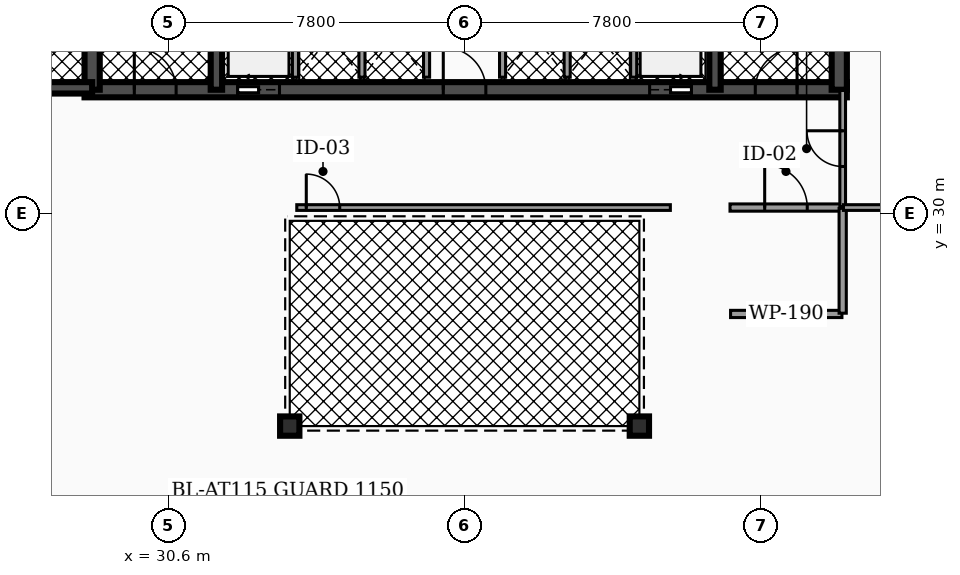
"""IFC4 building model, lengths in metres.
Left out: names, types, materials, properties, quantities, classifications, styles, units other than length and angle.
Written with IfcOpenShell. Run it as: python <this file> out.ifc"""

import sys

from ifc_helpers import new_model, si_unit, direction, frame, frame_2d, origin, origin_2d, place, context, subcontext, project, spatial, rectangle, hollow_circle, extrude, element, fill, save


model = new_model("IFC4")
c1 = context("Model", 3, precision=1e-05, world=origin(), true_north=direction((0.0, 1.0)))
c2 = subcontext(c1, "Body", "Model", "MODEL_VIEW")
j1 = project(units=[si_unit("LENGTHUNIT", "METRE"), si_unit("PLANEANGLEUNIT", "RADIAN")], contexts=[c1])
p1 = place(None, origin())
s1 = spatial("IfcSite", under=j1, at=p1, CompositionType="ELEMENT")
p2 = place(p1, origin())
s2 = spatial("IfcBuilding", under=s1, at=p2, CompositionType="ELEMENT")
p3 = place(p2, frame((0.0, 0.0, 47.94)))
s3 = spatial("IfcBuildingStorey", under=s2, at=p3, CompositionType="ELEMENT", Elevation=47.94)
p4 = place(p3, frame((28.4, 33.25, 0.0), z_axis=(0.0, 0.0, 1.0), x_axis=(1.0, 0.0, 0.0)))
e1 = element("IfcWall", 1, at=p4, inside=s3, PredefinedType="SHEAR", context=c2, shape_type="SweptSolid", body=[
    extrude(rectangle(XDim=20.06, YDim=0.4, at=frame_2d((10.03, 0.0))), origin(), (0.0, 0.0, 1.0), 3.82),
])
p5 = place(p4, frame((4.03, 0.0, 0.0)))
e2 = element("IfcOpeningElement", 2, at=p5, cuts=e1, PredefinedType="OPENING", context=c2, shape_type="SweptSolid", body=[
    extrude(rectangle(XDim=1.1, YDim=2.15, at=frame_2d((0.55, 1.075))), frame((0.0, 0.21, 0.0), z_axis=(0.0, -1.0, 0.0), x_axis=(1.0, 0.0, 0.0)), (0.0, 0.0, 1.0), 0.42),
])
p6 = place(p4, frame((14.87, 0.0, 0.0)))
e3 = element("IfcOpeningElement", 3, at=p6, cuts=e1, PredefinedType="OPENING", context=c2, shape_type="SweptSolid", body=[
    extrude(rectangle(XDim=1.1, YDim=2.15, at=frame_2d((0.55, 1.075))), frame((0.0, 0.21, 0.0), z_axis=(0.0, -1.0, 0.0), x_axis=(1.0, 0.0, 0.0)), (0.0, 0.0, 1.0), 0.42),
])
p7 = place(p4, frame((1.31, 0.0, 0.0)))
e4 = element("IfcOpeningElement", 4, at=p7, cuts=e1, PredefinedType="OPENING", context=c2, shape_type="SweptSolid", body=[
    extrude(rectangle(XDim=1.1, YDim=2.2, at=frame_2d((0.55, 1.1))), frame((0.0, 0.21, 0.0), z_axis=(0.0, -1.0, 0.0), x_axis=(1.0, 0.0, 0.0)), (0.0, 0.0, 1.0), 0.42),
])
p8 = place(p4, frame((9.44, 0.0, 0.0)))
e5 = element("IfcOpeningElement", 5, at=p8, cuts=e1, PredefinedType="OPENING", context=c2, shape_type="SweptSolid", body=[
    extrude(rectangle(XDim=1.12, YDim=2.05, at=frame_2d((0.56, 1.025))), frame((0.0, 0.21, 0.0), z_axis=(0.0, -1.0, 0.0), x_axis=(1.0, 0.0, 0.0)), (0.0, 0.0, 1.0), 0.42),
])
p9 = place(p4, frame((17.65, 0.0, 0.0)))
e6 = element("IfcOpeningElement", 6, at=p9, cuts=e1, PredefinedType="OPENING", context=c2, shape_type="SweptSolid", body=[
    extrude(rectangle(XDim=1.1, YDim=2.2, at=frame_2d((0.55, 1.1))), frame((0.0, 0.21, 0.0), z_axis=(0.0, -1.0, 0.0), x_axis=(1.0, 0.0, 0.0)), (0.0, 0.0, 1.0), 0.42),
])
p10 = place(p3, frame((28.6, 33.25, 0.0), z_axis=(0.0, 0.0, 1.0), x_axis=(0.0, 1.0, 0.0)))
e7 = element("IfcWall", 7, at=p10, inside=s3, PredefinedType="SHEAR", context=c2, shape_type="SweptSolid", body=[
    extrude(rectangle(XDim=10.2, YDim=0.4, at=frame_2d((5.1, 0.0))), origin(), (0.0, 0.0, 1.0), 3.82),
])
for number, where, z_axis, x_axis in (
    (8, (31.87, 33.25, 0.0), (0.0, 0.0, 1.0), (0.0, 1.0, 0.0)),
    (9, (44.99, 33.25, 0.0), (0.0, 0.0, 1.0), (0.0, 1.0, 0.0)),
):
    element("IfcWall", number, at=place(p3, frame(where, z_axis=z_axis, x_axis=x_axis)), inside=s3, PredefinedType="SHEAR", context=c2, shape_type="SweptSolid", body=[
        extrude(rectangle(XDim=10.2, YDim=0.3, at=frame_2d((5.1, 0.0))), origin(), (0.0, 0.0, 1.0), 3.82),
    ])
p11 = place(p3, frame((48.26, 33.25, 0.0), z_axis=(0.0, 0.0, 1.0), x_axis=(0.0, 1.0, 0.0)))
e10 = element("IfcWall", 10, at=p11, inside=s3, PredefinedType="SHEAR", context=c2, shape_type="SweptSolid", body=[
    extrude(rectangle(XDim=10.2, YDim=0.4, at=frame_2d((5.1, 0.0))), origin(), (0.0, 0.0, 1.0), 3.82),
])
p12 = place(p3, frame((25.08, 33.3, 0.0), z_axis=(0.0, 0.0, 1.0), x_axis=(1.0, 0.0, 0.0)))
e11 = element("IfcWall", 11, at=p12, inside=s3, PredefinedType="SHEAR", context=c2, shape_type="SweptSolid", body=[
    extrude(rectangle(XDim=3.52, YDim=0.3, at=frame_2d((1.76, 0.0))), origin(), (0.0, 0.0, 1.0), 3.82),
])
p13 = place(p12, frame((1.335, 0.0, 0.0)))
e12 = element("IfcOpeningElement", 12, at=p13, cuts=e11, PredefinedType="OPENING", context=c2, shape_type="SweptSolid", body=[
    extrude(rectangle(XDim=0.95, YDim=2.2, at=frame_2d((0.475, 1.1))), frame((0.0, 0.16, 0.0), z_axis=(0.0, -1.0, 0.0), x_axis=(1.0, 0.0, 0.0)), (0.0, 0.0, 1.0), 0.32),
])
for number, where, z_axis, x_axis in (
    (13, (33.8, 24.4, 0.0), (0.0, 0.0, 1.0), (1.0, 0.0, 0.0)),
    (14, (43.0, 24.4, 0.0), (0.0, 0.0, 1.0), (1.0, 0.0, 0.0)),
):
    element("IfcColumn", number, at=place(p3, frame(where, z_axis=z_axis, x_axis=x_axis)), inside=s3, PredefinedType="COLUMN", context=c2, shape_type="SweptSolid", body=[
        extrude(hollow_circle(Radius=0.254, WallThickness=0.02, at=origin_2d()), origin(), (0.0, 0.0, 1.0), 3.82),
    ])
for number, where, z_axis, x_axis in (
    (15, (33.95, 33.58, 0.0), (0.0, 0.0, 1.0), (0.0, 1.0, 0.0)),
    (16, (42.85, 33.58, 0.0), (0.0, 0.0, 1.0), (0.0, 1.0, 0.0)),
):
    element("IfcWall", number, at=place(p3, frame(where, z_axis=z_axis, x_axis=x_axis)), inside=s3, PredefinedType="SOLIDWALL", context=c2, shape_type="SweptSolid", body=[
        extrude(rectangle(XDim=2.45, YDim=0.16, at=frame_2d((1.225, 0.0))), origin(), (0.0, 0.0, 1.0), 2.792),
    ])
for number, where, z_axis, x_axis in (
    (17, (35.7, 33.58, 0.0), (0.0, 0.0, 1.0), (0.0, 1.0, 0.0)),
    (18, (37.4, 33.58, 0.0), (0.0, 0.0, 1.0), (0.0, 1.0, 0.0)),
    (19, (39.4, 33.58, 0.0), (0.0, 0.0, 1.0), (0.0, 1.0, 0.0)),
    (20, (41.1, 33.58, 0.0), (0.0, 0.0, 1.0), (0.0, 1.0, 0.0)),
):
    element("IfcWall", number, at=place(p3, frame(where, z_axis=z_axis, x_axis=x_axis)), inside=s3, PredefinedType="SOLIDWALL", context=c2, shape_type="SweptSolid", body=[
        extrude(rectangle(XDim=2.25, YDim=0.16, at=frame_2d((1.125, 0.0))), origin(), (0.0, 0.0, 1.0), 2.792),
    ])
p14 = place(p3, frame((45.385, 30.15, 0.0), z_axis=(0.0, 0.0, 1.0), x_axis=(1.0, 0.0, 0.0)))
e21 = element("IfcWall", 21, at=p14, inside=s3, PredefinedType="PARTITIONING", context=c2, shape_type="SweptSolid", body=[
    extrude(rectangle(XDim=2.945, YDim=0.19, at=frame_2d((1.473, 0.0))), origin(), (0.0, 0.0, 1.0), 2.777),
])
p15 = place(p14, frame((0.913, 0.0, 0.0)))
e22 = element("IfcOpeningElement", 22, at=p15, cuts=e21, PredefinedType="OPENING", context=c2, shape_type="SweptSolid", body=[
    extrude(rectangle(XDim=1.12, YDim=2.05, at=frame_2d((0.56, 1.025))), frame((0.0, 0.105, 0.0), z_axis=(0.0, -1.0, 0.0), x_axis=(1.0, 0.0, 0.0)), (0.0, 0.0, 1.0), 0.21),
])
p16 = place(p3, frame((48.35, 30.17, 0.0), z_axis=(0.0, 0.0, 1.0), x_axis=(0.0, 1.0, 0.0)))
e23 = element("IfcWall", 23, at=p16, inside=s3, PredefinedType="PARTITIONING", context=c2, shape_type="SweptSolid", body=[
    extrude(rectangle(XDim=3.06, YDim=0.15, at=frame_2d((1.53, 0.0))), origin(), (0.0, 0.0, 1.0), 2.777),
])
p17 = place(p16, frame((1.06, 0.0, 0.0)))
e24 = element("IfcOpeningElement", 24, at=p17, cuts=e23, PredefinedType="OPENING", context=c2, shape_type="SweptSolid", body=[
    extrude(rectangle(XDim=0.94, YDim=2.05, at=frame_2d((0.47, 1.025))), frame((0.0, 0.085, 0.0), z_axis=(0.0, -1.0, 0.0), x_axis=(1.0, 0.0, 0.0)), (0.0, 0.0, 1.0), 0.17),
])
p18 = place(p3, frame((33.985, 30.15, 0.0), z_axis=(0.0, 0.0, 1.0), x_axis=(1.0, 0.0, 0.0)))
e25 = element("IfcWall", 25, at=p18, inside=s3, PredefinedType="PARTITIONING", context=c2, shape_type="SweptSolid", body=[
    extrude(rectangle(XDim=9.83, YDim=0.15, at=frame_2d((4.915, 0.0))), origin(), (0.0, 0.0, 1.0), 2.777),
])
p19 = place(p18, frame((0.25, 0.0, 0.0)))
e26 = element("IfcOpeningElement", 26, at=p19, cuts=e25, PredefinedType="OPENING", context=c2, shape_type="SweptSolid", body=[
    extrude(rectangle(XDim=0.88, YDim=2.05, at=frame_2d((0.44, 1.025))), frame((0.0, 0.085, 0.0), z_axis=(0.0, -1.0, 0.0), x_axis=(1.0, 0.0, 0.0)), (0.0, 0.0, 1.0), 0.17),
])
p20 = place(p3, frame((45.4, 27.35, 0.0), z_axis=(0.0, 0.0, 1.0), x_axis=(1.0, 0.0, 0.0)))
e27 = element("IfcWall", 27, at=p20, inside=s3, PredefinedType="PARTITIONING", context=c2, shape_type="SweptSolid", body=[
    extrude(rectangle(XDim=2.93, YDim=0.19, at=frame_2d((1.465, 0.0))), origin(), (0.0, 0.0, 1.0), 2.777),
])
p21 = place(p3, frame((48.35, 27.37, 0.0), z_axis=(0.0, 0.0, 1.0), x_axis=(0.0, 1.0, 0.0)))
e28 = element("IfcWall", 28, at=p21, inside=s3, PredefinedType="PARTITIONING", context=c2, shape_type="SweptSolid", body=[
    extrude(rectangle(XDim=2.76, YDim=0.19, at=frame_2d((1.38, 0.0))), origin(), (0.0, 0.0, 1.0), 2.777),
])
p22 = place(p3, frame((48.37, 30.15, 0.0), z_axis=(0.0, 0.0, 1.0), x_axis=(1.0, 0.0, 0.0)))
e29 = element("IfcWall", 29, at=p22, inside=s3, PredefinedType="PARTITIONING", context=c2, shape_type="SweptSolid", body=[
    extrude(rectangle(XDim=2.06, YDim=0.15, at=frame_2d((1.03, 0.0))), origin(), (0.0, 0.0, 1.0), 2.777),
])
p23 = place(p5, origin())
e30 = element("IfcDoor", 30, at=p23, inside=s3, OperationType="SLIDING_TO_LEFT", PredefinedType="DOOR", context=c2, shape_type="SweptSolid", body=[
    extrude(rectangle(XDim=1.1, YDim=2.15, at=frame_2d((0.55, 1.075))), frame((0.0, 0.025, 0.0), z_axis=(0.0, -1.0, 0.0), x_axis=(1.0, 0.0, 0.0)), (0.0, 0.0, 1.0), 0.05),
])
fill(e2, e30)
p24 = place(p6, origin())
e31 = element("IfcDoor", 31, at=p24, inside=s3, OperationType="SLIDING_TO_RIGHT", PredefinedType="DOOR", context=c2, shape_type="SweptSolid", body=[
    extrude(rectangle(XDim=1.1, YDim=2.15, at=frame_2d((0.55, 1.075))), frame((0.0, 0.025, 0.0), z_axis=(0.0, -1.0, 0.0), x_axis=(1.0, 0.0, 0.0)), (0.0, 0.0, 1.0), 0.05),
])
fill(e3, e31)
p25 = place(p7, origin())
e32 = element("IfcDoor", 32, at=p25, inside=s3, OperationType="SINGLE_SWING_LEFT", PredefinedType="DOOR", context=c2, shape_type="SweptSolid", body=[
    extrude(rectangle(XDim=1.1, YDim=2.2, at=frame_2d((0.55, 1.1))), frame((0.0, 0.025, 0.0), z_axis=(0.0, -1.0, 0.0), x_axis=(1.0, 0.0, 0.0)), (0.0, 0.0, 1.0), 0.05),
])
fill(e4, e32)
p26 = place(p8, origin())
e33 = element("IfcDoor", 33, at=p26, inside=s3, OperationType="SINGLE_SWING_LEFT", PredefinedType="DOOR", context=c2, shape_type="SweptSolid", body=[
    extrude(rectangle(XDim=1.12, YDim=2.05, at=frame_2d((0.56, 1.025))), frame((0.0, 0.025, 0.0), z_axis=(0.0, -1.0, 0.0), x_axis=(1.0, 0.0, 0.0)), (0.0, 0.0, 1.0), 0.05),
])
fill(e5, e33)
p27 = place(p9, origin())
e34 = element("IfcDoor", 34, at=p27, inside=s3, OperationType="SINGLE_SWING_RIGHT", PredefinedType="DOOR", context=c2, shape_type="SweptSolid", body=[
    extrude(rectangle(XDim=1.1, YDim=2.2, at=frame_2d((0.55, 1.1))), frame((0.0, 0.025, 0.0), z_axis=(0.0, -1.0, 0.0), x_axis=(1.0, 0.0, 0.0)), (0.0, 0.0, 1.0), 0.05),
])
fill(e6, e34)
p28 = place(p15, origin())
e35 = element("IfcDoor", 35, at=p28, inside=s3, OperationType="SINGLE_SWING_LEFT", PredefinedType="DOOR", context=c2, shape_type="SweptSolid", body=[
    extrude(rectangle(XDim=1.12, YDim=2.05, at=frame_2d((0.56, 1.025))), frame((0.0, 0.025, 0.0), z_axis=(0.0, -1.0, 0.0), x_axis=(1.0, 0.0, 0.0)), (0.0, 0.0, 1.0), 0.05),
])
fill(e22, e35)
p29 = place(p17, origin())
e36 = element("IfcDoor", 36, at=p29, inside=s3, OperationType="SINGLE_SWING_RIGHT", PredefinedType="DOOR", context=c2, shape_type="SweptSolid", body=[
    extrude(rectangle(XDim=0.94, YDim=2.05, at=frame_2d((0.47, 1.025))), frame((0.0, 0.025, 0.0), z_axis=(0.0, -1.0, 0.0), x_axis=(1.0, 0.0, 0.0)), (0.0, 0.0, 1.0), 0.05),
])
fill(e24, e36)
p30 = place(p19, origin())
e37 = element("IfcDoor", 37, at=p30, inside=s3, OperationType="SINGLE_SWING_LEFT", PredefinedType="DOOR", context=c2, shape_type="SweptSolid", body=[
    extrude(rectangle(XDim=0.88, YDim=2.05, at=frame_2d((0.44, 1.025))), frame((0.0, 0.025, 0.0), z_axis=(0.0, -1.0, 0.0), x_axis=(1.0, 0.0, 0.0)), (0.0, 0.0, 1.0), 0.05),
])
fill(e26, e37)
save(model, sys.argv[1])
